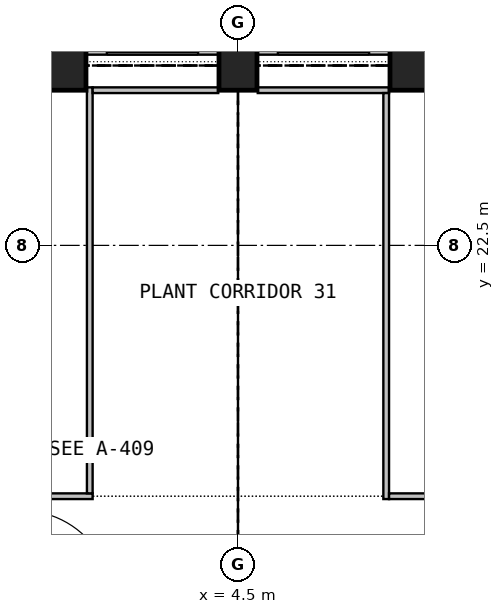
"""IFC4 building model, lengths in metres.
Left out: names, types, materials, properties, quantities, classifications, styles, units other than length and angle.
Written with IfcOpenShell. Run it as: python <this file> out.ifc"""

import sys

from ifc_helpers import new_model, si_unit, direction, frame, frame_2d, origin, origin_2d, place, context, subcontext, project, spatial, rectangle, extrude, element, fill, save


model = new_model("IFC4")
c1 = context("Model", 3, precision=1e-05, world=origin(), true_north=direction((0.0, 1.0)))
c2 = subcontext(c1, "Body", "Model", "MODEL_VIEW")
j1 = project(units=[si_unit("LENGTHUNIT", "METRE"), si_unit("PLANEANGLEUNIT", "RADIAN")], contexts=[c1])
p1 = place(None, origin())
s1 = spatial("IfcSite", under=j1, at=p1, CompositionType="ELEMENT")
p2 = place(p1, origin())
s2 = spatial("IfcBuilding", under=s1, at=p2, CompositionType="ELEMENT")
p3 = place(p2, frame((0.0, 0.0, 128.1)))
s3 = spatial("IfcBuildingStorey", under=s2, at=p3, CompositionType="ELEMENT", Elevation=128.1)
for number, where, z_axis, x_axis in (
    (1, (9.0, 27.233, 0.0), (0.0, 0.0, 1.0), (-1.0, 0.0, 0.0)),
    (2, (4.5, 27.233, 0.0), (0.0, 0.0, 1.0), (-1.0, 0.0, 0.0)),
    (3, (0.0, 27.233, 0.0), (0.0, 0.0, 1.0), (-1.0, 0.0, 0.0)),
):
    element("IfcColumn", number, at=place(p3, frame(where, z_axis=z_axis, x_axis=x_axis)), inside=s3, PredefinedType="COLUMN", context=c2, shape_type="SweptSolid", body=[
        extrude(rectangle(XDim=1.0, YDim=1.3, at=origin_2d()), origin(), (0.0, 0.0, 1.0), 4.175),
    ])
p4 = place(p3, frame((8.5, 27.578, 0.0), z_axis=(0.0, 0.0, 1.0), x_axis=(-1.0, 0.0, 0.0)))
e4 = element("IfcWall", 4, at=p4, inside=s3, PredefinedType="SOLIDWALL", context=c2, shape_type="SweptSolid", body=[
    extrude(rectangle(XDim=3.499, YDim=0.12, at=frame_2d((1.75, 0.0))), origin(), (0.0, 0.0, 1.0), 4.175),
])
p5 = place(p4, frame((0.55, 0.0, 0.6)))
e5 = element("IfcOpeningElement", 5, at=p5, cuts=e4, PredefinedType="OPENING", context=c2, shape_type="SweptSolid", body=[
    extrude(rectangle(XDim=2.4, YDim=3.0, at=frame_2d((1.2, 1.5))), frame((0.0, 0.07, 0.0), z_axis=(0.0, -1.0, 0.0), x_axis=(1.0, 0.0, 0.0)), (0.0, 0.0, 1.0), 0.14),
])
p6 = place(p3, frame((4.0, 27.578, 0.0), z_axis=(0.0, 0.0, 1.0), x_axis=(-1.0, 0.0, 0.0)))
e6 = element("IfcWall", 6, at=p6, inside=s3, PredefinedType="SOLIDWALL", context=c2, shape_type="SweptSolid", body=[
    extrude(rectangle(XDim=3.499, YDim=0.12, at=frame_2d((1.75, 0.0))), origin(), (0.0, 0.0, 1.0), 4.175),
])
p7 = place(p6, frame((0.55, 0.0, 0.6)))
e7 = element("IfcOpeningElement", 7, at=p7, cuts=e6, PredefinedType="OPENING", context=c2, shape_type="SweptSolid", body=[
    extrude(rectangle(XDim=2.4, YDim=3.0, at=frame_2d((1.2, 1.5))), frame((0.0, 0.07, 0.0), z_axis=(0.0, -1.0, 0.0), x_axis=(1.0, 0.0, 0.0)), (0.0, 0.0, 1.0), 0.14),
])
p8 = place(p3, frame((0.675, 15.9, 0.0), z_axis=(0.0, 0.0, 1.0), x_axis=(-1.0, 0.0, 0.0)))
e8 = element("IfcWall", 8, at=p8, inside=s3, PredefinedType="PARTITIONING", context=c2, shape_type="SweptSolid", body=[
    extrude(rectangle(XDim=18.75, YDim=0.15, at=frame_2d((9.375, 0.0))), origin(), (0.0, 0.0, 1.0), 4.175),
])
p9 = place(p8, frame((8.875, 0.0, 0.0)))
e9 = element("IfcOpeningElement", 9, at=p9, cuts=e8, PredefinedType="OPENING", context=c2, shape_type="SweptSolid", body=[
    extrude(rectangle(XDim=1.0, YDim=2.1, at=frame_2d((0.5, 1.05))), frame((0.0, 0.085, 0.0), z_axis=(0.0, -1.0, 0.0), x_axis=(1.0, 0.0, 0.0)), (0.0, 0.0, 1.0), 0.17),
])
p10 = place(p3, frame((0.6, 15.975, 0.0), z_axis=(0.0, 0.0, 1.0), x_axis=(0.0, 1.0, 0.0)))
e10 = element("IfcWall", 10, at=p10, inside=s3, PredefinedType="PARTITIONING", context=c2, shape_type="SweptSolid", body=[
    extrude(rectangle(XDim=10.683, YDim=0.15, at=frame_2d((5.341, 0.0))), origin(), (0.0, 0.0, 1.0), 4.175),
])
p11 = place(p3, frame((0.675, 26.583, 0.0), z_axis=(0.0, 0.0, 1.0), x_axis=(1.0, 0.0, 0.0)))
e11 = element("IfcWall", 11, at=p11, inside=s3, PredefinedType="PARTITIONING", context=c2, shape_type="SweptSolid", body=[
    extrude(rectangle(XDim=3.305, YDim=0.15, at=frame_2d((1.652, 0.0))), origin(), (0.0, 0.0, 1.0), 4.175),
])
p12 = place(p3, frame((5.02, 26.583, 0.0), z_axis=(0.0, 0.0, 1.0), x_axis=(1.0, 0.0, 0.0)))
e12 = element("IfcWall", 12, at=p12, inside=s3, PredefinedType="PARTITIONING", context=c2, shape_type="SweptSolid", body=[
    extrude(rectangle(XDim=3.455, YDim=0.15, at=frame_2d((1.728, 0.0))), origin(), (0.0, 0.0, 1.0), 4.175),
])
p13 = place(p3, frame((8.4, 26.508, 0.0), z_axis=(0.0, 0.0, 1.0), x_axis=(0.0, -1.0, 0.0)))
e13 = element("IfcWall", 13, at=p13, inside=s3, PredefinedType="PARTITIONING", context=c2, shape_type="SweptSolid", body=[
    extrude(rectangle(XDim=10.683, YDim=0.15, at=frame_2d((5.342, 0.0))), origin(), (0.0, 0.0, 1.0), 4.175),
])
p14 = place(p3, frame((18.225, 15.9, 0.0), z_axis=(0.0, 0.0, 1.0), x_axis=(-1.0, 0.0, 0.0)))
e14 = element("IfcWall", 14, at=p14, inside=s3, PredefinedType="PARTITIONING", context=c2, shape_type="SweptSolid", body=[
    extrude(rectangle(XDim=9.75, YDim=0.15, at=frame_2d((4.875, 0.0))), origin(), (0.0, 0.0, 1.0), 4.175),
])
p15 = place(p5, origin())
e15 = element("IfcWindow", 15, at=p15, inside=s3, PartitioningType="SINGLE_PANEL", PredefinedType="WINDOW", context=c2, shape_type="SweptSolid", body=[
    extrude(rectangle(XDim=2.4, YDim=3.0, at=frame_2d((1.2, 1.5))), frame((0.0, 0.06, 0.0), z_axis=(0.0, -1.0, 0.0), x_axis=(1.0, 0.0, 0.0)), (0.0, 0.0, 1.0), 0.02),
])
fill(e5, e15)
p16 = place(p7, origin())
e16 = element("IfcWindow", 16, at=p16, inside=s3, PartitioningType="SINGLE_PANEL", PredefinedType="WINDOW", context=c2, shape_type="SweptSolid", body=[
    extrude(rectangle(XDim=2.4, YDim=3.0, at=frame_2d((1.2, 1.5))), frame((0.0, 0.06, 0.0), z_axis=(0.0, -1.0, 0.0), x_axis=(1.0, 0.0, 0.0)), (0.0, 0.0, 1.0), 0.02),
])
fill(e7, e16)
save(model, sys.argv[1])
